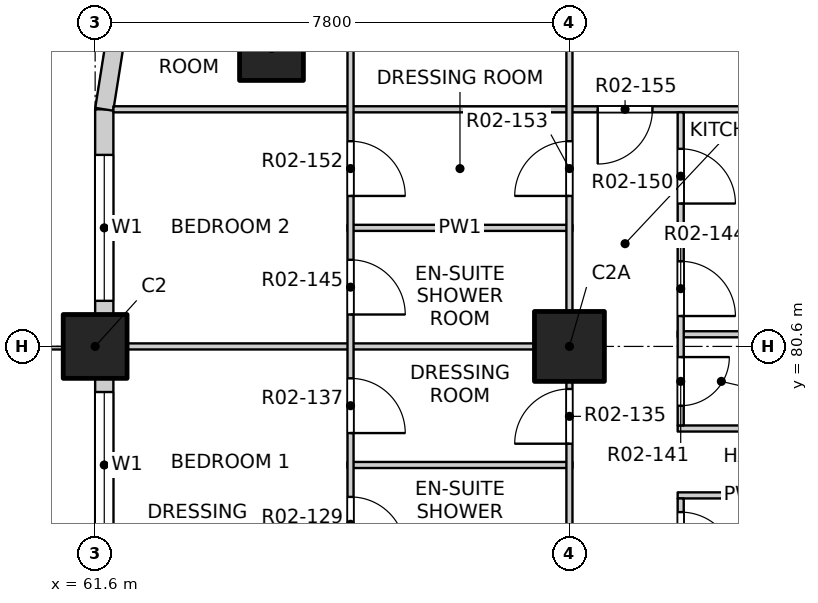
"""IFC4 building model, lengths in metres.
Left out: names, types, materials, properties, quantities, classifications, styles, units other than length and angle.
Written with IfcOpenShell. Run it as: python <this file> out.ifc"""

import sys

from ifc_helpers import new_model, si_unit, direction, frame, frame_2d, origin, origin_2d, place, context, subcontext, project, spatial, rectangle, extrude, element, fill, save


model = new_model("IFC4")
c1 = context("Model", 3, precision=1e-05, world=origin(), true_north=direction((0.0, 1.0)))
c2 = subcontext(c1, "Body", "Model", "MODEL_VIEW")
j1 = project(units=[si_unit("LENGTHUNIT", "METRE"), si_unit("PLANEANGLEUNIT", "RADIAN")], contexts=[c1])
p1 = place(None, origin())
s1 = spatial("IfcSite", under=j1, at=p1, CompositionType="ELEMENT")
p2 = place(p1, origin())
s2 = spatial("IfcBuilding", under=s1, at=p2, CompositionType="ELEMENT")
p3 = place(p2, frame((0.0, 0.0, 36.5)))
s3 = spatial("IfcBuildingStorey", under=s2, at=p3, CompositionType="ELEMENT", Elevation=36.5)
for number, where, z_axis, x_axis in (
    (1, (64.5, 85.5, -0.25), (0.0, 0.0, 1.0), (1.0, 0.0, 0.0)),
    (2, (61.6, 80.6, -0.25), (0.0, 0.0, 1.0), (1.0, 0.0, 0.0)),
):
    element("IfcColumn", number, at=place(p3, frame(where, z_axis=z_axis, x_axis=x_axis)), inside=s3, PredefinedType="COLUMN", context=c2, shape_type="SweptSolid", body=[
        extrude(rectangle(XDim=1.05, YDim=1.05, at=origin_2d()), origin(), (0.0, 0.0, 1.0), 3.4),
    ])
p4 = place(p3, frame((69.4, 80.6, -0.25), z_axis=(0.0, 0.0, 1.0), x_axis=(1.0, 0.0, 0.0)))
e3 = element("IfcColumn", 3, at=p4, inside=s3, PredefinedType="COLUMN", context=c2, shape_type="SweptSolid", body=[
    extrude(rectangle(XDim=1.15, YDim=1.15, at=origin_2d()), origin(), (0.0, 0.0, 1.0), 3.4),
])
p5 = place(p3, frame((61.75, 73.325, 0.0), z_axis=(0.0, 0.0, 1.0), x_axis=(0.0, 1.0, 0.0)))
e4 = element("IfcWall", 4, at=p5, inside=s3, PredefinedType="SOLIDWALL", context=c2, shape_type="SweptSolid", body=[
    extrude(rectangle(XDim=6.75, YDim=0.3, at=frame_2d((3.375, 0.0))), origin(), (0.0, 0.0, 1.0), 2.7),
])
p6 = place(p5, frame((0.525, 0.0, 0.0)))
e5 = element("IfcOpeningElement", 5, at=p6, cuts=e4, PredefinedType="OPENING", context=c2, shape_type="SweptSolid", body=[
    extrude(rectangle(XDim=1.8, YDim=2.4, at=frame_2d((0.9, 1.2))), frame((0.0, 0.16, 0.0), z_axis=(0.0, -1.0, 0.0), x_axis=(1.0, 0.0, 0.0)), (0.0, 0.0, 1.0), 0.32),
])
p7 = place(p5, frame((4.125, 0.0, 0.9)))
e6 = element("IfcOpeningElement", 6, at=p7, cuts=e4, PredefinedType="OPENING", context=c2, shape_type="SweptSolid", body=[
    extrude(rectangle(XDim=2.4, YDim=1.8, at=frame_2d((1.2, 0.9))), frame((0.0, 0.16, 0.0), z_axis=(0.0, -1.0, 0.0), x_axis=(1.0, 0.0, 0.0)), (0.0, 0.0, 1.0), 0.32),
])
p8 = place(p3, frame((61.75, 81.125, 0.0), z_axis=(0.0, 0.0, 1.0), x_axis=(0.0, 1.0, 0.0)))
e7 = element("IfcWall", 7, at=p8, inside=s3, PredefinedType="SOLIDWALL", context=c2, shape_type="SweptSolid", body=[
    extrude(rectangle(XDim=3.375, YDim=0.3, at=frame_2d((1.688, 0.0))), origin(), (0.0, 0.0, 1.0), 2.7),
])
p9 = place(p8, frame((0.225, 0.0, 0.9)))
e8 = element("IfcOpeningElement", 8, at=p9, cuts=e7, PredefinedType="OPENING", context=c2, shape_type="SweptSolid", body=[
    extrude(rectangle(XDim=2.4, YDim=1.8, at=frame_2d((1.2, 0.9))), frame((0.0, 0.16, 0.0), z_axis=(0.0, -1.0, 0.0), x_axis=(1.0, 0.0, 0.0)), (0.0, 0.0, 1.0), 0.32),
])
p10 = place(p3, frame((61.934, 85.659, 0.0), z_axis=(0.0, 0.0, 1.0), x_axis=(-0.156496880861, -0.987678452879, 0.0)))
e9 = element("IfcWall", 9, at=p10, inside=s3, PredefinedType="SOLIDWALL", context=c2, shape_type="SweptSolid", body=[
    extrude(rectangle(XDim=1.173, YDim=0.3, at=frame_2d((0.586, 0.0))), origin(), (0.0, 0.0, 1.0), 2.7),
])
p11 = place(p3, frame((71.18, 78.15, 0.0), z_axis=(0.0, 0.0, 1.0), x_axis=(1.0, 0.0, 0.0)))
e10 = element("IfcWall", 10, at=p11, inside=s3, PredefinedType="PARTITIONING", context=c2, shape_type="SweptSolid", body=[
    extrude(rectangle(XDim=2.22, YDim=0.1, at=frame_2d((1.11, 0.0))), origin(), (0.0, 0.0, 1.0), 3.15),
])
p12 = place(p3, frame((65.75, 78.65, 0.0), z_axis=(0.0, 0.0, 1.0), x_axis=(1.0, 0.0, 0.0)))
e11 = element("IfcWall", 11, at=p12, inside=s3, PredefinedType="PARTITIONING", context=c2, shape_type="SweptSolid", body=[
    extrude(rectangle(XDim=3.7, YDim=0.1, at=frame_2d((1.85, 0.0))), origin(), (0.0, 0.0, 1.0), 3.15),
])
p13 = place(p3, frame((71.18, 79.25, 0.0), z_axis=(0.0, 0.0, 1.0), x_axis=(1.0, 0.0, 0.0)))
e12 = element("IfcWall", 12, at=p13, inside=s3, PredefinedType="PARTITIONING", context=c2, shape_type="SweptSolid", body=[
    extrude(rectangle(XDim=2.22, YDim=0.1, at=frame_2d((1.11, 0.0))), origin(), (0.0, 0.0, 1.0), 3.15),
])
p14 = place(p3, frame((61.9, 80.6, 0.0), z_axis=(0.0, 0.0, 1.0), x_axis=(1.0, 0.0, 0.0)))
e13 = element("IfcWall", 13, at=p14, inside=s3, PredefinedType="PARTITIONING", context=c2, shape_type="SweptSolid", body=[
    extrude(rectangle(XDim=7.55, YDim=0.1, at=frame_2d((3.775, 0.0))), origin(), (0.0, 0.0, 1.0), 2.55),
])
for number, where, z_axis, x_axis in (
    (14, (71.18, 80.8, 0.0), (0.0, 0.0, 1.0), (1.0, 0.0, 0.0)),
    (15, (71.18, 82.3, 0.0), (0.0, 0.0, 1.0), (1.0, 0.0, 0.0)),
):
    element("IfcWall", number, at=place(p3, frame(where, z_axis=z_axis, x_axis=x_axis)), inside=s3, PredefinedType="PARTITIONING", context=c2, shape_type="SweptSolid", body=[
        extrude(rectangle(XDim=2.22, YDim=0.1, at=frame_2d((1.11, 0.0))), origin(), (0.0, 0.0, 1.0), 3.15),
    ])
p15 = place(p3, frame((65.75, 82.55, 0.0), z_axis=(0.0, 0.0, 1.0), x_axis=(1.0, 0.0, 0.0)))
e16 = element("IfcWall", 16, at=p15, inside=s3, PredefinedType="PARTITIONING", context=c2, shape_type="SweptSolid", body=[
    extrude(rectangle(XDim=3.7, YDim=0.1, at=frame_2d((1.85, 0.0))), origin(), (0.0, 0.0, 1.0), 3.15),
])
p16 = place(p3, frame((61.9, 84.5, 0.0), z_axis=(0.0, 0.0, 1.0), x_axis=(1.0, 0.0, 0.0)))
e17 = element("IfcWall", 17, at=p16, inside=s3, PredefinedType="PARTITIONING", context=c2, shape_type="SweptSolid", body=[
    extrude(rectangle(XDim=11.5, YDim=0.1, at=frame_2d((5.75, 0.0))), origin(), (0.0, 0.0, 1.0), 3.15),
])
p17 = place(p16, frame((7.965, 0.0, 0.0)))
e18 = element("IfcOpeningElement", 18, at=p17, cuts=e17, PredefinedType="OPENING", context=c2, shape_type="SweptSolid", body=[
    extrude(rectangle(XDim=0.9, YDim=2.1, at=frame_2d((0.45, 1.05))), frame((0.0, 0.06, 0.0), z_axis=(0.0, -1.0, 0.0), x_axis=(1.0, 0.0, 0.0)), (0.0, 0.0, 1.0), 0.12),
])
p18 = place(p3, frame((65.8, 76.8, 0.0), z_axis=(0.0, 0.0, 1.0), x_axis=(0.0, 1.0, 0.0)))
e19 = element("IfcWall", 19, at=p18, inside=s3, PredefinedType="PARTITIONING", context=c2, shape_type="SweptSolid", body=[
    extrude(rectangle(XDim=11.3, YDim=0.1, at=frame_2d((5.65, 0.0))), origin(), (0.0, 0.0, 1.0), 3.15),
])
p19 = place(p18, frame((0.425, 0.0, 0.0)))
e20 = element("IfcOpeningElement", 20, at=p19, cuts=e19, PredefinedType="OPENING", context=c2, shape_type="SweptSolid", body=[
    extrude(rectangle(XDim=0.9, YDim=2.1, at=frame_2d((0.45, 1.05))), frame((0.0, 0.06, 0.0), z_axis=(0.0, -1.0, 0.0), x_axis=(1.0, 0.0, 0.0)), (0.0, 0.0, 1.0), 0.12),
])
p20 = place(p18, frame((2.375, 0.0, 0.0)))
e21 = element("IfcOpeningElement", 21, at=p20, cuts=e19, PredefinedType="OPENING", context=c2, shape_type="SweptSolid", body=[
    extrude(rectangle(XDim=0.9, YDim=2.1, at=frame_2d((0.45, 1.05))), frame((0.0, 0.06, 0.0), z_axis=(0.0, -1.0, 0.0), x_axis=(1.0, 0.0, 0.0)), (0.0, 0.0, 1.0), 0.12),
])
p21 = place(p18, frame((4.325, 0.0, 0.0)))
e22 = element("IfcOpeningElement", 22, at=p21, cuts=e19, PredefinedType="OPENING", context=c2, shape_type="SweptSolid", body=[
    extrude(rectangle(XDim=0.9, YDim=2.1, at=frame_2d((0.45, 1.05))), frame((0.0, 0.06, 0.0), z_axis=(0.0, -1.0, 0.0), x_axis=(1.0, 0.0, 0.0)), (0.0, 0.0, 1.0), 0.12),
])
p22 = place(p18, frame((6.275, 0.0, 0.0)))
e23 = element("IfcOpeningElement", 23, at=p22, cuts=e19, PredefinedType="OPENING", context=c2, shape_type="SweptSolid", body=[
    extrude(rectangle(XDim=0.9, YDim=2.1, at=frame_2d((0.45, 1.05))), frame((0.0, 0.06, 0.0), z_axis=(0.0, -1.0, 0.0), x_axis=(1.0, 0.0, 0.0)), (0.0, 0.0, 1.0), 0.12),
])
p23 = place(p18, frame((9.05, 0.0, 0.0)))
e24 = element("IfcOpeningElement", 24, at=p23, cuts=e19, PredefinedType="OPENING", context=c2, shape_type="SweptSolid", body=[
    extrude(rectangle(XDim=1.2, YDim=2.1, at=frame_2d((0.6, 1.05))), frame((0.0, 0.06, 0.0), z_axis=(0.0, -1.0, 0.0), x_axis=(1.0, 0.0, 0.0)), (0.0, 0.0, 1.0), 0.12),
])
p24 = place(p3, frame((69.4, 41.9, 0.0), z_axis=(0.0, 0.0, 1.0), x_axis=(0.0, 1.0, 0.0)))
e25 = element("IfcWall", 25, at=p24, inside=s3, PredefinedType="PARTITIONING", context=c2, shape_type="SweptSolid", body=[
    extrude(rectangle(XDim=46.2, YDim=0.1, at=frame_2d((23.1, 0.0))), origin(), (0.0, 0.0, 1.0), 3.15),
])
p25 = place(p24, frame((1.2, 0.0, 0.0)))
e26 = element("IfcOpeningElement", 26, at=p25, cuts=e25, PredefinedType="OPENING", context=c2, shape_type="SweptSolid", body=[
    extrude(rectangle(XDim=0.9, YDim=2.1, at=frame_2d((0.45, 1.05))), frame((0.0, 0.06, 0.0), z_axis=(0.0, -1.0, 0.0), x_axis=(1.0, 0.0, 0.0)), (0.0, 0.0, 1.0), 0.12),
])
p26 = place(p24, frame((5.1, 0.0, 0.0)))
e27 = element("IfcOpeningElement", 27, at=p26, cuts=e25, PredefinedType="OPENING", context=c2, shape_type="SweptSolid", body=[
    extrude(rectangle(XDim=0.9, YDim=2.1, at=frame_2d((0.45, 1.05))), frame((0.0, 0.06, 0.0), z_axis=(0.0, -1.0, 0.0), x_axis=(1.0, 0.0, 0.0)), (0.0, 0.0, 1.0), 0.12),
])
p27 = place(p24, frame((9.975, 0.0, 0.0)))
e28 = element("IfcOpeningElement", 28, at=p27, cuts=e25, PredefinedType="OPENING", context=c2, shape_type="SweptSolid", body=[
    extrude(rectangle(XDim=0.9, YDim=2.1, at=frame_2d((0.45, 1.05))), frame((0.0, 0.06, 0.0), z_axis=(0.0, -1.0, 0.0), x_axis=(1.0, 0.0, 0.0)), (0.0, 0.0, 1.0), 0.12),
])
p28 = place(p24, frame((12.9, 0.0, 0.0)))
e29 = element("IfcOpeningElement", 29, at=p28, cuts=e25, PredefinedType="OPENING", context=c2, shape_type="SweptSolid", body=[
    extrude(rectangle(XDim=0.9, YDim=2.1, at=frame_2d((0.45, 1.05))), frame((0.0, 0.06, 0.0), z_axis=(0.0, -1.0, 0.0), x_axis=(1.0, 0.0, 0.0)), (0.0, 0.0, 1.0), 0.12),
])
p29 = place(p24, frame((17.775, 0.0, 0.0)))
e30 = element("IfcOpeningElement", 30, at=p29, cuts=e25, PredefinedType="OPENING", context=c2, shape_type="SweptSolid", body=[
    extrude(rectangle(XDim=0.9, YDim=2.1, at=frame_2d((0.45, 1.05))), frame((0.0, 0.06, 0.0), z_axis=(0.0, -1.0, 0.0), x_axis=(1.0, 0.0, 0.0)), (0.0, 0.0, 1.0), 0.12),
])
p30 = place(p24, frame((21.5, 0.0, 0.0)))
e31 = element("IfcOpeningElement", 31, at=p30, cuts=e25, PredefinedType="OPENING", context=c2, shape_type="SweptSolid", body=[
    extrude(rectangle(XDim=0.9, YDim=2.1, at=frame_2d((0.45, 1.05))), frame((0.0, 0.06, 0.0), z_axis=(0.0, -1.0, 0.0), x_axis=(1.0, 0.0, 0.0)), (0.0, 0.0, 1.0), 0.12),
])
p31 = place(p24, frame((24.6, 0.0, 0.0)))
e32 = element("IfcOpeningElement", 32, at=p31, cuts=e25, PredefinedType="OPENING", context=c2, shape_type="SweptSolid", body=[
    extrude(rectangle(XDim=0.9, YDim=2.1, at=frame_2d((0.45, 1.05))), frame((0.0, 0.06, 0.0), z_axis=(0.0, -1.0, 0.0), x_axis=(1.0, 0.0, 0.0)), (0.0, 0.0, 1.0), 0.12),
])
p32 = place(p24, frame((29.3, 0.0, 0.0)))
e33 = element("IfcOpeningElement", 33, at=p32, cuts=e25, PredefinedType="OPENING", context=c2, shape_type="SweptSolid", body=[
    extrude(rectangle(XDim=0.9, YDim=2.1, at=frame_2d((0.45, 1.05))), frame((0.0, 0.06, 0.0), z_axis=(0.0, -1.0, 0.0), x_axis=(1.0, 0.0, 0.0)), (0.0, 0.0, 1.0), 0.12),
])
p33 = place(p24, frame((33.375, 0.0, 0.0)))
e34 = element("IfcOpeningElement", 34, at=p33, cuts=e25, PredefinedType="OPENING", context=c2, shape_type="SweptSolid", body=[
    extrude(rectangle(XDim=0.9, YDim=2.1, at=frame_2d((0.45, 1.05))), frame((0.0, 0.06, 0.0), z_axis=(0.0, -1.0, 0.0), x_axis=(1.0, 0.0, 0.0)), (0.0, 0.0, 1.0), 0.12),
])
p34 = place(p24, frame((37.1, 0.0, 0.0)))
e35 = element("IfcOpeningElement", 35, at=p34, cuts=e25, PredefinedType="OPENING", context=c2, shape_type="SweptSolid", body=[
    extrude(rectangle(XDim=0.9, YDim=2.1, at=frame_2d((0.45, 1.05))), frame((0.0, 0.06, 0.0), z_axis=(0.0, -1.0, 0.0), x_axis=(1.0, 0.0, 0.0)), (0.0, 0.0, 1.0), 0.12),
])
p35 = place(p24, frame((41.175, 0.0, 0.0)))
e36 = element("IfcOpeningElement", 36, at=p35, cuts=e25, PredefinedType="OPENING", context=c2, shape_type="SweptSolid", body=[
    extrude(rectangle(XDim=0.9, YDim=2.1, at=frame_2d((0.45, 1.05))), frame((0.0, 0.06, 0.0), z_axis=(0.0, -1.0, 0.0), x_axis=(1.0, 0.0, 0.0)), (0.0, 0.0, 1.0), 0.12),
])
p36 = place(p24, frame((44.1, 0.0, 0.0)))
e37 = element("IfcOpeningElement", 37, at=p36, cuts=e25, PredefinedType="OPENING", context=c2, shape_type="SweptSolid", body=[
    extrude(rectangle(XDim=0.9, YDim=2.1, at=frame_2d((0.45, 1.05))), frame((0.0, 0.06, 0.0), z_axis=(0.0, -1.0, 0.0), x_axis=(1.0, 0.0, 0.0)), (0.0, 0.0, 1.0), 0.12),
])
p37 = place(p3, frame((71.23, 71.4, 0.0), z_axis=(0.0, 0.0, 1.0), x_axis=(0.0, 1.0, 0.0)))
e38 = element("IfcWall", 38, at=p37, inside=s3, PredefinedType="PARTITIONING", context=c2, shape_type="SweptSolid", body=[
    extrude(rectangle(XDim=6.7, YDim=0.1, at=frame_2d((3.35, 0.0))), origin(), (0.0, 0.0, 1.0), 3.15),
])
p38 = place(p37, frame((0.4, 0.0, 0.0)))
e39 = element("IfcOpeningElement", 39, at=p38, cuts=e38, PredefinedType="OPENING", context=c2, shape_type="SweptSolid", body=[
    extrude(rectangle(XDim=0.9, YDim=2.1, at=frame_2d((0.45, 1.05))), frame((0.0, 0.06, 0.0), z_axis=(0.0, -1.0, 0.0), x_axis=(1.0, 0.0, 0.0)), (0.0, 0.0, 1.0), 0.12),
])
p39 = place(p37, frame((3.075, 0.0, 0.0)))
e40 = element("IfcOpeningElement", 40, at=p39, cuts=e38, PredefinedType="OPENING", context=c2, shape_type="SweptSolid", body=[
    extrude(rectangle(XDim=0.9, YDim=2.1, at=frame_2d((0.45, 1.05))), frame((0.0, 0.06, 0.0), z_axis=(0.0, -1.0, 0.0), x_axis=(1.0, 0.0, 0.0)), (0.0, 0.0, 1.0), 0.12),
])
p40 = place(p37, frame((5.575, 0.0, 0.0)))
e41 = element("IfcOpeningElement", 41, at=p40, cuts=e38, PredefinedType="OPENING", context=c2, shape_type="SweptSolid", body=[
    extrude(rectangle(XDim=0.9, YDim=2.1, at=frame_2d((0.45, 1.05))), frame((0.0, 0.06, 0.0), z_axis=(0.0, -1.0, 0.0), x_axis=(1.0, 0.0, 0.0)), (0.0, 0.0, 1.0), 0.12),
])
p41 = place(p3, frame((71.23, 79.3, 0.0), z_axis=(0.0, 0.0, 1.0), x_axis=(0.0, 1.0, 0.0)))
e42 = element("IfcWall", 42, at=p41, inside=s3, PredefinedType="PARTITIONING", context=c2, shape_type="SweptSolid", body=[
    extrude(rectangle(XDim=5.15, YDim=0.1, at=frame_2d((2.575, 0.0))), origin(), (0.0, 0.0, 1.0), 3.15),
])
p42 = place(p41, frame((0.325, 0.0, 0.0)))
e43 = element("IfcOpeningElement", 43, at=p42, cuts=e42, PredefinedType="OPENING", context=c2, shape_type="SweptSolid", body=[
    extrude(rectangle(XDim=0.8, YDim=2.1, at=frame_2d((0.4, 1.05))), frame((0.0, 0.06, 0.0), z_axis=(0.0, -1.0, 0.0), x_axis=(1.0, 0.0, 0.0)), (0.0, 0.0, 1.0), 0.12),
])
p43 = place(p41, frame((1.8, 0.0, 0.0)))
e44 = element("IfcOpeningElement", 44, at=p43, cuts=e42, PredefinedType="OPENING", context=c2, shape_type="SweptSolid", body=[
    extrude(rectangle(XDim=0.9, YDim=2.1, at=frame_2d((0.45, 1.05))), frame((0.0, 0.06, 0.0), z_axis=(0.0, -1.0, 0.0), x_axis=(1.0, 0.0, 0.0)), (0.0, 0.0, 1.0), 0.12),
])
p44 = place(p41, frame((3.65, 0.0, 0.0)))
e45 = element("IfcOpeningElement", 45, at=p44, cuts=e42, PredefinedType="OPENING", context=c2, shape_type="SweptSolid", body=[
    extrude(rectangle(XDim=0.9, YDim=2.1, at=frame_2d((0.45, 1.05))), frame((0.0, 0.06, 0.0), z_axis=(0.0, -1.0, 0.0), x_axis=(1.0, 0.0, 0.0)), (0.0, 0.0, 1.0), 0.12),
])
p45 = place(p7, origin())
e46 = element("IfcWindow", 46, at=p45, inside=s3, PartitioningType="DOUBLE_PANEL_VERTICAL", PredefinedType="WINDOW", context=c2, shape_type="SweptSolid", body=[
    extrude(rectangle(XDim=2.4, YDim=1.8, at=frame_2d((1.2, 0.9))), frame((0.0, 0.03, 0.0), z_axis=(0.0, -1.0, 0.0), x_axis=(1.0, 0.0, 0.0)), (0.0, 0.0, 1.0), 0.06),
])
fill(e6, e46)
p46 = place(p9, origin())
e47 = element("IfcWindow", 47, at=p46, inside=s3, PartitioningType="DOUBLE_PANEL_VERTICAL", PredefinedType="WINDOW", context=c2, shape_type="SweptSolid", body=[
    extrude(rectangle(XDim=2.4, YDim=1.8, at=frame_2d((1.2, 0.9))), frame((0.0, 0.03, 0.0), z_axis=(0.0, -1.0, 0.0), x_axis=(1.0, 0.0, 0.0)), (0.0, 0.0, 1.0), 0.06),
])
fill(e8, e47)
p47 = place(p40, origin())
e48 = element("IfcDoor", 48, at=p47, inside=s3, OperationType="SINGLE_SWING_RIGHT", PredefinedType="DOOR", context=c2, shape_type="SweptSolid", body=[
    extrude(rectangle(XDim=0.9, YDim=2.1, at=frame_2d((0.45, 1.05))), frame((0.0, 0.025, 0.0), z_axis=(0.0, -1.0, 0.0), x_axis=(1.0, 0.0, 0.0)), (0.0, 0.0, 1.0), 0.05),
])
fill(e41, e48)
p48 = place(p19, origin())
e49 = element("IfcDoor", 49, at=p48, inside=s3, OperationType="SINGLE_SWING_RIGHT", PredefinedType="DOOR", context=c2, shape_type="SweptSolid", body=[
    extrude(rectangle(XDim=0.9, YDim=2.1, at=frame_2d((0.45, 1.05))), frame((0.0, 0.025, 0.0), z_axis=(0.0, -1.0, 0.0), x_axis=(1.0, 0.0, 0.0)), (0.0, 0.0, 1.0), 0.05),
])
fill(e20, e49)
p49 = place(p34, origin())
e50 = element("IfcDoor", 50, at=p49, inside=s3, OperationType="SINGLE_SWING_LEFT", PredefinedType="DOOR", context=c2, shape_type="SweptSolid", body=[
    extrude(rectangle(XDim=0.9, YDim=2.1, at=frame_2d((0.45, 1.05))), frame((0.0, 0.025, 0.0), z_axis=(0.0, -1.0, 0.0), x_axis=(1.0, 0.0, 0.0)), (0.0, 0.0, 1.0), 0.05),
])
fill(e35, e50)
p50 = place(p20, origin())
e51 = element("IfcDoor", 51, at=p50, inside=s3, OperationType="SINGLE_SWING_RIGHT", PredefinedType="DOOR", context=c2, shape_type="SweptSolid", body=[
    extrude(rectangle(XDim=0.9, YDim=2.1, at=frame_2d((0.45, 1.05))), frame((0.0, 0.025, 0.0), z_axis=(0.0, -1.0, 0.0), x_axis=(1.0, 0.0, 0.0)), (0.0, 0.0, 1.0), 0.05),
])
fill(e21, e51)
p51 = place(p42, origin())
e52 = element("IfcDoor", 52, at=p51, inside=s3, OperationType="SINGLE_SWING_LEFT", PredefinedType="DOOR", context=c2, shape_type="SweptSolid", body=[
    extrude(rectangle(XDim=0.8, YDim=2.1, at=frame_2d((0.4, 1.05))), frame((0.0, 0.025, 0.0), z_axis=(0.0, -1.0, 0.0), x_axis=(1.0, 0.0, 0.0)), (0.0, 0.0, 1.0), 0.05),
])
fill(e43, e52)
p52 = place(p43, origin())
e53 = element("IfcDoor", 53, at=p52, inside=s3, OperationType="SINGLE_SWING_RIGHT", PredefinedType="DOOR", context=c2, shape_type="SweptSolid", body=[
    extrude(rectangle(XDim=0.9, YDim=2.1, at=frame_2d((0.45, 1.05))), frame((0.0, 0.025, 0.0), z_axis=(0.0, -1.0, 0.0), x_axis=(1.0, 0.0, 0.0)), (0.0, 0.0, 1.0), 0.05),
])
fill(e44, e53)
p53 = place(p21, origin())
e54 = element("IfcDoor", 54, at=p53, inside=s3, OperationType="SINGLE_SWING_RIGHT", PredefinedType="DOOR", context=c2, shape_type="SweptSolid", body=[
    extrude(rectangle(XDim=0.9, YDim=2.1, at=frame_2d((0.45, 1.05))), frame((0.0, 0.025, 0.0), z_axis=(0.0, -1.0, 0.0), x_axis=(1.0, 0.0, 0.0)), (0.0, 0.0, 1.0), 0.05),
])
fill(e22, e54)
p54 = place(p44, origin())
e55 = element("IfcDoor", 55, at=p54, inside=s3, OperationType="SINGLE_SWING_RIGHT", PredefinedType="DOOR", context=c2, shape_type="SweptSolid", body=[
    extrude(rectangle(XDim=0.9, YDim=2.1, at=frame_2d((0.45, 1.05))), frame((0.0, 0.025, 0.0), z_axis=(0.0, -1.0, 0.0), x_axis=(1.0, 0.0, 0.0)), (0.0, 0.0, 1.0), 0.05),
])
fill(e45, e55)
p55 = place(p22, origin())
e56 = element("IfcDoor", 56, at=p55, inside=s3, OperationType="SINGLE_SWING_RIGHT", PredefinedType="DOOR", context=c2, shape_type="SweptSolid", body=[
    extrude(rectangle(XDim=0.9, YDim=2.1, at=frame_2d((0.45, 1.05))), frame((0.0, 0.025, 0.0), z_axis=(0.0, -1.0, 0.0), x_axis=(1.0, 0.0, 0.0)), (0.0, 0.0, 1.0), 0.05),
])
fill(e23, e56)
p56 = place(p35, origin())
e57 = element("IfcDoor", 57, at=p56, inside=s3, OperationType="SINGLE_SWING_LEFT", PredefinedType="DOOR", context=c2, shape_type="SweptSolid", body=[
    extrude(rectangle(XDim=0.9, YDim=2.1, at=frame_2d((0.45, 1.05))), frame((0.0, 0.025, 0.0), z_axis=(0.0, -1.0, 0.0), x_axis=(1.0, 0.0, 0.0)), (0.0, 0.0, 1.0), 0.05),
])
fill(e36, e57)
p57 = place(p17, origin())
e58 = element("IfcDoor", 58, at=p57, inside=s3, OperationType="SINGLE_SWING_RIGHT", PredefinedType="DOOR", context=c2, shape_type="SweptSolid", body=[
    extrude(rectangle(XDim=0.9, YDim=2.1, at=frame_2d((0.45, 1.05))), frame((0.0, 0.025, 0.0), z_axis=(0.0, -1.0, 0.0), x_axis=(1.0, 0.0, 0.0)), (0.0, 0.0, 1.0), 0.05),
])
fill(e18, e58)
save(model, sys.argv[1])
